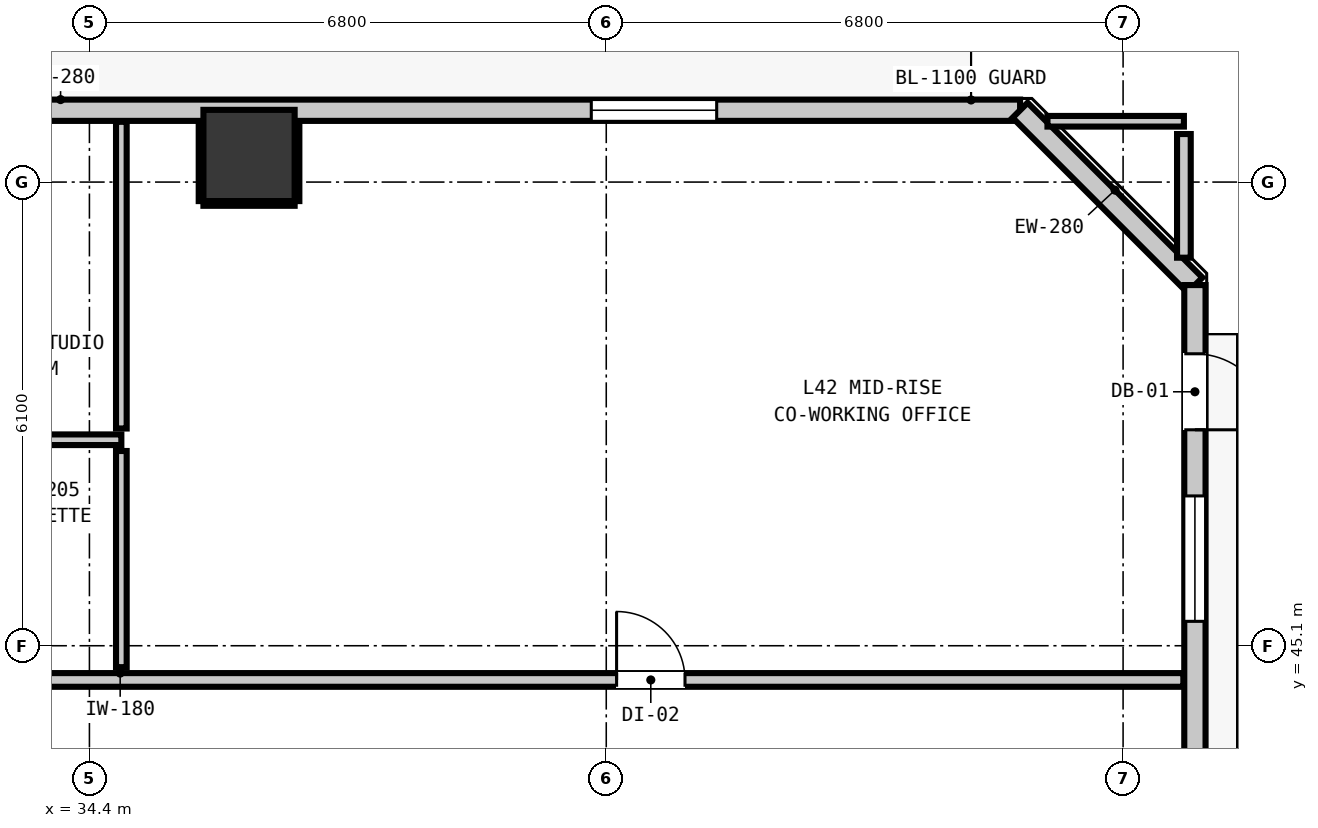
"""IFC4 building model, lengths in metres.
Left out: names, types, materials, properties, quantities, classifications, styles, units other than length and angle.
Written with IfcOpenShell. Run it as: python <this file> out.ifc"""

import sys

from ifc_helpers import new_model, si_unit, direction, frame, frame_2d, origin, origin_2d, place, context, subcontext, project, spatial, rectangle, extrude, element, fill, save


model = new_model("IFC4")
c1 = context("Model", 3, precision=1e-05, world=origin(), true_north=direction((0.0, 1.0)))
c2 = subcontext(c1, "Body", "Model", "MODEL_VIEW")
j1 = project(units=[si_unit("LENGTHUNIT", "METRE"), si_unit("PLANEANGLEUNIT", "RADIAN")], contexts=[c1])
p1 = place(None, origin())
s1 = spatial("IfcSite", under=j1, at=p1, CompositionType="ELEMENT")
p2 = place(p1, origin())
s2 = spatial("IfcBuilding", under=s1, at=p2, CompositionType="ELEMENT")
p3 = place(p2, frame((0.0, 0.0, 145.92)))
s3 = spatial("IfcBuildingStorey", under=s2, at=p3, CompositionType="ELEMENT", Elevation=145.92)
p4 = place(p3, frame((36.5, 51.55, -0.2), z_axis=(0.0, 0.0, 1.0), x_axis=(1.0, 0.0, 0.0)))
e1 = element("IfcColumn", 1, at=p4, inside=s3, PredefinedType="COLUMN", context=c2, shape_type="SweptSolid", body=[
    extrude(rectangle(XDim=1.2, YDim=1.2, at=origin_2d()), origin(), (0.0, 0.0, 1.0), 3.52),
])
p5 = place(p3, frame((11.555, 52.145, 0.0), z_axis=(0.0, 0.0, 1.0), x_axis=(1.0, 0.0, 0.0)))
e2 = element("IfcWall", 2, at=p5, inside=s3, PredefinedType="STANDARD", context=c2, shape_type="SweptSolid", body=[
    extrude(rectangle(XDim=35.09, YDim=0.28, at=frame_2d((17.545, 0.0))), origin(), (0.0, 0.0, 1.0), 3.08),
])
p6 = place(p5, frame((4.062, 0.0, 0.0)))
e3 = element("IfcOpeningElement", 3, at=p6, cuts=e2, PredefinedType="OPENING", context=c2, shape_type="SweptSolid", body=[
    extrude(rectangle(XDim=1.0, YDim=2.15, at=frame_2d((0.5, 1.075))), frame((0.0, 0.15, 0.0), z_axis=(0.0, -1.0, 0.0), x_axis=(1.0, 0.0, 0.0)), (0.0, 0.0, 1.0), 0.3),
])
p7 = place(p5, frame((5.588, 0.0, 0.85)))
e4 = element("IfcOpeningElement", 4, at=p7, cuts=e2, PredefinedType="OPENING", context=c2, shape_type="SweptSolid", body=[
    extrude(rectangle(XDim=1.65, YDim=1.75, at=frame_2d((0.825, 0.875))), frame((0.0, 0.15, 0.0), z_axis=(0.0, -1.0, 0.0), x_axis=(1.0, 0.0, 0.0)), (0.0, 0.0, 1.0), 0.3),
])
p8 = place(p5, frame((0.378, 0.0, 0.85)))
e5 = element("IfcOpeningElement", 5, at=p8, cuts=e2, PredefinedType="OPENING", context=c2, shape_type="SweptSolid", body=[
    extrude(rectangle(XDim=0.58, YDim=1.5, at=frame_2d((0.29, 0.75))), frame((0.0, 0.15, 0.0), z_axis=(0.0, -1.0, 0.0), x_axis=(1.0, 0.0, 0.0)), (0.0, 0.0, 1.0), 0.3),
])
p9 = place(p5, frame((10.133, 0.0, 0.85)))
e6 = element("IfcOpeningElement", 6, at=p9, cuts=e2, PredefinedType="OPENING", context=c2, shape_type="SweptSolid", body=[
    extrude(rectangle(XDim=1.65, YDim=1.75, at=frame_2d((0.825, 0.875))), frame((0.0, 0.15, 0.0), z_axis=(0.0, -1.0, 0.0), x_axis=(1.0, 0.0, 0.0)), (0.0, 0.0, 1.0), 0.3),
])
p10 = place(p5, frame((13.833, 0.0, 0.85)))
e7 = element("IfcOpeningElement", 7, at=p10, cuts=e2, PredefinedType="OPENING", context=c2, shape_type="SweptSolid", body=[
    extrude(rectangle(XDim=1.65, YDim=1.75, at=frame_2d((0.825, 0.875))), frame((0.0, 0.15, 0.0), z_axis=(0.0, -1.0, 0.0), x_axis=(1.0, 0.0, 0.0)), (0.0, 0.0, 1.0), 0.3),
])
p11 = place(p5, frame((29.448, 0.0, 0.85)))
e8 = element("IfcOpeningElement", 8, at=p11, cuts=e2, PredefinedType="OPENING", context=c2, shape_type="SweptSolid", body=[
    extrude(rectangle(XDim=1.65, YDim=1.75, at=frame_2d((0.825, 0.875))), frame((0.0, 0.15, 0.0), z_axis=(0.0, -1.0, 0.0), x_axis=(1.0, 0.0, 0.0)), (0.0, 0.0, 1.0), 0.3),
])
p12 = place(p3, frame((46.645, 52.145, 0.0), z_axis=(0.0, 0.0, 1.0), x_axis=(0.707106781187, -0.707106781187, 0.0)))
e9 = element("IfcWall", 9, at=p12, inside=s3, PredefinedType="STANDARD", context=c2, shape_type="SweptSolid", body=[
    extrude(rectangle(XDim=3.253, YDim=0.28, at=frame_2d((1.626, 0.0))), origin(), (0.0, 0.0, 1.0), 3.08),
])
p13 = place(p3, frame((48.945, 49.845, 0.0), z_axis=(0.0, 0.0, 1.0), x_axis=(0.0, -1.0, 0.0)))
e10 = element("IfcWall", 10, at=p13, inside=s3, PredefinedType="STANDARD", context=c2, shape_type="SweptSolid", body=[
    extrude(rectangle(XDim=32.29, YDim=0.28, at=frame_2d((16.145, 0.0))), origin(), (0.0, 0.0, 1.0), 3.08),
])
p14 = place(p13, frame((0.904, 0.0, 0.0)))
e11 = element("IfcOpeningElement", 11, at=p14, cuts=e10, PredefinedType="OPENING", context=c2, shape_type="SweptSolid", body=[
    extrude(rectangle(XDim=1.0, YDim=2.15, at=frame_2d((0.5, 1.075))), frame((0.0, 0.15, 0.0), z_axis=(0.0, -1.0, 0.0), x_axis=(1.0, 0.0, 0.0)), (0.0, 0.0, 1.0), 0.3),
])
p15 = place(p13, frame((2.774, 0.0, 0.85)))
e12 = element("IfcOpeningElement", 12, at=p15, cuts=e10, PredefinedType="OPENING", context=c2, shape_type="SweptSolid", body=[
    extrude(rectangle(XDim=1.65, YDim=1.75, at=frame_2d((0.825, 0.875))), frame((0.0, 0.15, 0.0), z_axis=(0.0, -1.0, 0.0), x_axis=(1.0, 0.0, 0.0)), (0.0, 0.0, 1.0), 0.3),
])
p16 = place(p13, frame((23.582, 0.0, 0.85)))
e13 = element("IfcOpeningElement", 13, at=p16, cuts=e10, PredefinedType="OPENING", context=c2, shape_type="SweptSolid", body=[
    extrude(rectangle(XDim=1.65, YDim=1.75, at=frame_2d((0.825, 0.875))), frame((0.0, 0.15, 0.0), z_axis=(0.0, -1.0, 0.0), x_axis=(1.0, 0.0, 0.0)), (0.0, 0.0, 1.0), 0.3),
])
p17 = place(p13, frame((20.433, 0.0, 0.85)))
e14 = element("IfcOpeningElement", 14, at=p17, cuts=e10, PredefinedType="OPENING", context=c2, shape_type="SweptSolid", body=[
    extrude(rectangle(XDim=1.65, YDim=1.75, at=frame_2d((0.825, 0.875))), frame((0.0, 0.15, 0.0), z_axis=(0.0, -1.0, 0.0), x_axis=(1.0, 0.0, 0.0)), (0.0, 0.0, 1.0), 0.3),
])
p18 = place(p13, frame((14.048, 0.0, 0.85)))
e15 = element("IfcOpeningElement", 15, at=p18, cuts=e10, PredefinedType="OPENING", context=c2, shape_type="SweptSolid", body=[
    extrude(rectangle(XDim=1.65, YDim=1.75, at=frame_2d((0.825, 0.875))), frame((0.0, 0.15, 0.0), z_axis=(0.0, -1.0, 0.0), x_axis=(1.0, 0.0, 0.0)), (0.0, 0.0, 1.0), 0.3),
])
p19 = place(p13, frame((11.247, 0.0, 0.85)))
e16 = element("IfcOpeningElement", 16, at=p19, cuts=e10, PredefinedType="OPENING", context=c2, shape_type="SweptSolid", body=[
    extrude(rectangle(XDim=1.05, YDim=1.65, at=frame_2d((0.525, 0.825))), frame((0.0, 0.15, 0.0), z_axis=(0.0, -1.0, 0.0), x_axis=(1.0, 0.0, 0.0)), (0.0, 0.0, 1.0), 0.3),
])
p20 = place(p3, frame((9.407, 44.65, 0.0), z_axis=(0.0, 0.0, 1.0), x_axis=(1.0, 0.0, 0.0)))
e17 = element("IfcWall", 17, at=p20, inside=s3, PredefinedType="PARTITIONING", context=c2, shape_type="SweptSolid", body=[
    extrude(rectangle(XDim=39.386, YDim=0.18, at=frame_2d((19.693, 0.0))), origin(), (0.0, 0.0, 1.0), 3.08),
])
p21 = place(p20, frame((7.193, 0.0, 0.0)))
e18 = element("IfcOpeningElement", 18, at=p21, cuts=e17, PredefinedType="OPENING", context=c2, shape_type="SweptSolid", body=[
    extrude(rectangle(XDim=1.0, YDim=2.15, at=frame_2d((0.5, 1.075))), frame((0.0, 0.1, 0.0), z_axis=(0.0, -1.0, 0.0), x_axis=(1.0, 0.0, 0.0)), (0.0, 0.0, 1.0), 0.2),
])
p22 = place(p20, frame((17.866, 0.0, 0.0)))
e19 = element("IfcOpeningElement", 19, at=p22, cuts=e17, PredefinedType="OPENING", context=c2, shape_type="SweptSolid", body=[
    extrude(rectangle(XDim=1.0, YDim=2.15, at=frame_2d((0.5, 1.075))), frame((0.0, 0.1, 0.0), z_axis=(0.0, -1.0, 0.0), x_axis=(1.0, 0.0, 0.0)), (0.0, 0.0, 1.0), 0.2),
])
p23 = place(p20, frame((31.929, 0.0, 0.0)))
e20 = element("IfcOpeningElement", 20, at=p23, cuts=e17, PredefinedType="OPENING", context=c2, shape_type="SweptSolid", body=[
    extrude(rectangle(XDim=0.9, YDim=2.1, at=frame_2d((0.45, 1.05))), frame((0.0, 0.1, 0.0), z_axis=(0.0, -1.0, 0.0), x_axis=(1.0, 0.0, 0.0)), (0.0, 0.0, 1.0), 0.2),
])
p24 = place(p3, frame((31.82, 47.81, 0.0), z_axis=(0.0, 0.0, 1.0), x_axis=(1.0, 0.0, 0.0)))
e21 = element("IfcWall", 21, at=p24, inside=s3, PredefinedType="PARTITIONING", context=c2, shape_type="SweptSolid", body=[
    extrude(rectangle(XDim=3.0, YDim=0.14, at=frame_2d((1.5, 0.0))), origin(), (0.0, 0.0, 1.0), 3.08),
])
p25 = place(p3, frame((47.005, 52.0, 0.0), z_axis=(0.0, 0.0, 1.0), x_axis=(1.0, 0.0, 0.0)))
e22 = element("IfcWall", 22, at=p25, inside=s3, PredefinedType="PARTITIONING", context=c2, shape_type="SweptSolid", body=[
    extrude(rectangle(XDim=1.795, YDim=0.14, at=frame_2d((0.897, 0.0))), origin(), (0.0, 0.0, 1.0), 3.08),
])
p26 = place(p3, frame((48.8, 50.205, 0.0), z_axis=(0.0, 0.0, 1.0), x_axis=(0.0, 1.0, 0.0)))
e23 = element("IfcWall", 23, at=p26, inside=s3, PredefinedType="PARTITIONING", context=c2, shape_type="SweptSolid", body=[
    extrude(rectangle(XDim=1.627, YDim=0.18, at=frame_2d((0.813, 0.0))), origin(), (0.0, 0.0, 1.0), 3.08),
])
p27 = place(p3, frame((34.82, 44.818, 0.0), z_axis=(0.0, 0.0, 1.0), x_axis=(0.0, 1.0, 0.0)))
e24 = element("IfcWall", 24, at=p27, inside=s3, PredefinedType="PARTITIONING", context=c2, shape_type="SweptSolid", body=[
    extrude(rectangle(XDim=2.844, YDim=0.14, at=frame_2d((1.422, 0.0))), origin(), (0.0, 0.0, 1.0), 3.08),
])
p28 = place(p3, frame((34.82, 47.958, 0.0), z_axis=(0.0, 0.0, 1.0), x_axis=(0.0, 1.0, 0.0)))
e25 = element("IfcWall", 25, at=p28, inside=s3, PredefinedType="PARTITIONING", context=c2, shape_type="SweptSolid", body=[
    extrude(rectangle(XDim=4.035, YDim=0.14, at=frame_2d((2.018, 0.0))), origin(), (0.0, 0.0, 1.0), 3.08),
])
p29 = place(p3, frame((35.9, 50.918, 0.0), z_axis=(0.0, 0.0, 1.0), x_axis=(1.0, 0.0, 0.0)))
e26 = element("IfcWall", 26, at=p29, inside=s3, PredefinedType="PARTITIONING", context=c2, shape_type="SweptSolid", body=[
    extrude(rectangle(XDim=1.2, YDim=0.06, at=frame_2d((0.6, 0.0))), origin(), (0.0, 0.0, 1.0), 1.45),
])
for number, where, z_axis, x_axis in (
    (27, (35.868, 50.95, 0.0), (0.0, 0.0, 1.0), (0.0, 1.0, 0.0)),
    (28, (37.132, 50.95, 0.0), (0.0, 0.0, 1.0), (0.0, 1.0, 0.0)),
):
    element("IfcWall", number, at=place(p3, frame(where, z_axis=z_axis, x_axis=x_axis)), inside=s3, PredefinedType="PARTITIONING", context=c2, shape_type="SweptSolid", body=[
        extrude(rectangle(XDim=1.04, YDim=0.06, at=frame_2d((0.52, 0.0))), origin(), (0.0, 0.0, 1.0), 1.45),
    ])
p30 = place(p14, origin())
e29 = element("IfcDoor", 29, at=p30, inside=s3, OperationType="SINGLE_SWING_RIGHT", PredefinedType="DOOR", context=c2, shape_type="SweptSolid", body=[
    extrude(rectangle(XDim=1.0, YDim=2.15, at=frame_2d((0.5, 1.075))), frame((0.0, 0.025, 0.0), z_axis=(0.0, -1.0, 0.0), x_axis=(1.0, 0.0, 0.0)), (0.0, 0.0, 1.0), 0.05),
])
fill(e11, e29)
p31 = place(p11, origin())
e30 = element("IfcWindow", 30, at=p31, inside=s3, PartitioningType="SINGLE_PANEL", PredefinedType="WINDOW", context=c2, shape_type="SweptSolid", body=[
    extrude(rectangle(XDim=1.65, YDim=1.75, at=frame_2d((0.825, 0.875))), frame((0.0, 0.03, 0.0), z_axis=(0.0, -1.0, 0.0), x_axis=(1.0, 0.0, 0.0)), (0.0, 0.0, 1.0), 0.06),
])
fill(e8, e30)
p32 = place(p15, origin())
e31 = element("IfcWindow", 31, at=p32, inside=s3, PartitioningType="SINGLE_PANEL", PredefinedType="WINDOW", context=c2, shape_type="SweptSolid", body=[
    extrude(rectangle(XDim=1.65, YDim=1.75, at=frame_2d((0.825, 0.875))), frame((0.0, 0.03, 0.0), z_axis=(0.0, -1.0, 0.0), x_axis=(1.0, 0.0, 0.0)), (0.0, 0.0, 1.0), 0.06),
])
fill(e12, e31)
p33 = place(p23, origin())
e32 = element("IfcDoor", 32, at=p33, inside=s3, OperationType="SINGLE_SWING_LEFT", PredefinedType="DOOR", context=c2, shape_type="SweptSolid", body=[
    extrude(rectangle(XDim=0.9, YDim=2.1, at=frame_2d((0.45, 1.05))), frame((0.0, 0.025, 0.0), z_axis=(0.0, -1.0, 0.0), x_axis=(1.0, 0.0, 0.0)), (0.0, 0.0, 1.0), 0.05),
])
fill(e20, e32)
save(model, sys.argv[1])
